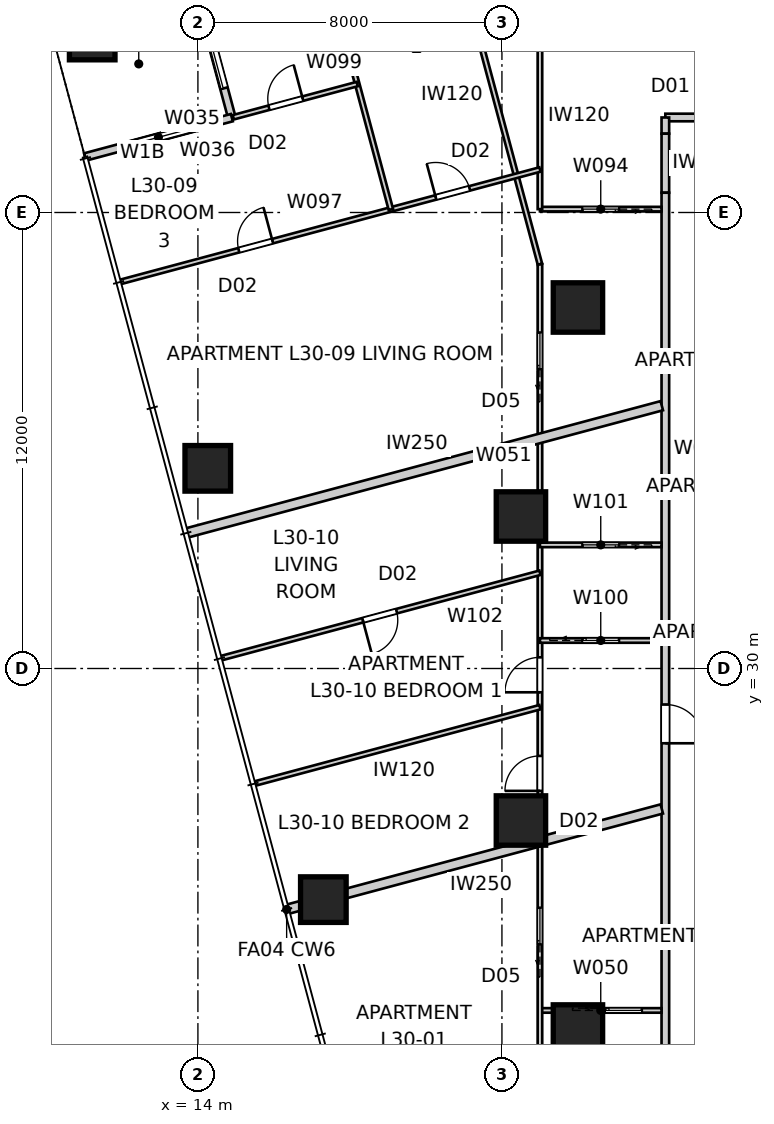
"""IFC4 building model, lengths in metres.
Left out: names, types, materials, properties, quantities, classifications, styles, units other than length and angle.
Written with IfcOpenShell. Run it as: python <this file> out.ifc"""

import sys

from ifc_helpers import new_model, si_unit, direction, frame, frame_2d, origin, origin_2d, place, context, subcontext, project, spatial, rectangle, extrude, element, fill, save


model = new_model("IFC4")
c1 = context("Model", 3, precision=1e-05, world=origin(), true_north=direction((0.0, 1.0)))
c2 = subcontext(c1, "Body", "Model", "MODEL_VIEW")
j1 = project(units=[si_unit("LENGTHUNIT", "METRE"), si_unit("PLANEANGLEUNIT", "RADIAN")], contexts=[c1])
p1 = place(None, origin())
s1 = spatial("IfcSite", under=j1, at=p1, CompositionType="ELEMENT")
p2 = place(p1, origin())
s2 = spatial("IfcBuilding", under=s1, at=p2, CompositionType="ELEMENT")
p3 = place(p2, frame((0.0, 0.0, 111.6)))
s3 = spatial("IfcBuildingStorey", under=s2, at=p3, CompositionType="ELEMENT", Elevation=111.6)
for number, where, z_axis, x_axis in (
    (1, (11.219, 46.617, -0.15), (0.0, 0.0, 1.0), (1.0, 0.0, 0.0)),
    (2, (14.26, 35.267, -0.15), (0.0, 0.0, 1.0), (1.0, 0.0, 0.0)),
    (3, (17.301, 23.918, -0.15), (0.0, 0.0, 1.0), (1.0, 0.0, 0.0)),
):
    element("IfcColumn", number, at=place(p3, frame(where, z_axis=z_axis, x_axis=x_axis)), inside=s3, PredefinedType="COLUMN", context=c2, shape_type="SweptSolid", body=[
        extrude(rectangle(XDim=1.2, YDim=1.2, at=origin_2d()), origin(), (0.0, 0.0, 1.0), 3.55),
    ])
for number, where, z_axis, x_axis in (
    (4, (24.0, 39.5, 0.0), (0.0, 0.0, 1.0), (1.0, 0.0, 0.0)),
    (5, (22.5, 34.0, 0.0), (0.0, 0.0, 1.0), (1.0, 0.0, 0.0)),
    (6, (22.5, 26.0, 0.0), (0.0, 0.0, 1.0), (1.0, 0.0, 0.0)),
    (7, (24.0, 20.5, 0.0), (0.0, 0.0, 1.0), (1.0, 0.0, 0.0)),
):
    element("IfcColumn", number, at=place(p3, frame(where, z_axis=z_axis, x_axis=x_axis)), inside=s3, PredefinedType="COLUMN", context=c2, shape_type="SweptSolid", body=[
        extrude(rectangle(XDim=1.3, YDim=1.3, at=origin_2d()), origin(), (0.0, 0.0, 1.0), 3.4),
    ])
p4 = place(p3, frame((13.857, 48.359, 0.0), z_axis=(0.0, 0.0, 1.0), x_axis=(0.258843877716, -0.965919172068, 0.0)))
e8 = element("IfcWall", 8, at=p4, inside=s3, PredefinedType="SOLIDWALL", context=c2, shape_type="SweptSolid", body=[
    extrude(rectangle(XDim=4.0, YDim=0.2, at=frame_2d((2.0, 0.0))), origin(), (0.0, 0.0, 1.0), 3.25),
])
p5 = place(p4, frame((0.8, 0.0, 0.0)))
e9 = element("IfcOpeningElement", 9, at=p5, cuts=e8, PredefinedType="OPENING", context=c2, shape_type="SweptSolid", body=[
    extrude(rectangle(XDim=2.4, YDim=2.1, at=frame_2d((1.2, 1.05))), frame((0.0, 0.11, 0.0), z_axis=(0.0, -1.0, 0.0), x_axis=(1.0, 0.0, 0.0)), (0.0, 0.0, 1.0), 0.22),
])
p6 = place(p3, frame((14.893, 44.496, 0.0), z_axis=(0.0, 0.0, 1.0), x_axis=(-0.965934430412, -0.258786931944, 0.0)))
e10 = element("IfcWall", 10, at=p6, inside=s3, PredefinedType="SOLIDWALL", context=c2, shape_type="SweptSolid", body=[
    extrude(rectangle(XDim=4.0, YDim=0.2, at=frame_2d((2.0, 0.0))), origin(), (0.0, 0.0, 1.0), 3.25),
])
p7 = place(p6, frame((1.0, 0.0, 0.45)))
e11 = element("IfcOpeningElement", 11, at=p7, cuts=e10, PredefinedType="OPENING", context=c2, shape_type="SweptSolid", body=[
    extrude(rectangle(XDim=2.0, YDim=1.8, at=frame_2d((1.0, 0.9))), frame((0.0, 0.11, 0.0), z_axis=(0.0, -1.0, 0.0), x_axis=(1.0, 0.0, 0.0)), (0.0, 0.0, 1.0), 0.22),
])
p8 = place(p3, frame((54.5, 44.5, 0.0), z_axis=(0.0, 0.0, 1.0), x_axis=(-1.0, 0.0, 0.0)))
e12 = element("IfcWall", 12, at=p8, inside=s3, PredefinedType="PARTITIONING", context=c2, shape_type="SweptSolid", body=[
    extrude(rectangle(XDim=28.2, YDim=0.2, at=frame_2d((14.1, 0.0))), origin(), (0.0, 0.0, 1.0), 3.25),
])
p9 = place(p8, frame((10.837, 0.0, 0.0)))
e13 = element("IfcOpeningElement", 13, at=p9, cuts=e12, PredefinedType="OPENING", context=c2, shape_type="SweptSolid", body=[
    extrude(rectangle(XDim=1.02, YDim=2.34, at=frame_2d((0.51, 1.17))), frame((0.0, 0.11, 0.0), z_axis=(0.0, -1.0, 0.0), x_axis=(1.0, 0.0, 0.0)), (0.0, 0.0, 1.0), 0.22),
])
p10 = place(p8, frame((5.7, 0.0, 0.0)))
e14 = element("IfcOpeningElement", 14, at=p10, cuts=e12, PredefinedType="OPENING", context=c2, shape_type="SweptSolid", body=[
    extrude(rectangle(XDim=1.02, YDim=2.34, at=frame_2d((0.51, 1.17))), frame((0.0, 0.11, 0.0), z_axis=(0.0, -1.0, 0.0), x_axis=(1.0, 0.0, 0.0)), (0.0, 0.0, 1.0), 0.22),
])
p11 = place(p8, frame((26.127, 0.0, 0.0)))
e15 = element("IfcOpeningElement", 15, at=p11, cuts=e12, PredefinedType="OPENING", context=c2, shape_type="SweptSolid", body=[
    extrude(rectangle(XDim=1.02, YDim=2.34, at=frame_2d((0.51, 1.17))), frame((0.0, 0.11, 0.0), z_axis=(0.0, -1.0, 0.0), x_axis=(1.0, 0.0, 0.0)), (0.0, 0.0, 1.0), 0.22),
])
p12 = place(p3, frame((26.3, 44.5, 0.0), z_axis=(0.0, 0.0, 1.0), x_axis=(0.0, -1.0, 0.0)))
e16 = element("IfcWall", 16, at=p12, inside=s3, PredefinedType="PARTITIONING", context=c2, shape_type="SweptSolid", body=[
    extrude(rectangle(XDim=0.426, YDim=0.2, at=frame_2d((0.213, 0.0))), origin(), (0.0, 0.0, 1.0), 3.25),
])
p13 = place(p3, frame((26.3, 44.074, 0.0), z_axis=(0.0, 0.0, 1.0), x_axis=(0.0, -1.0, 0.0)))
e17 = element("IfcWall", 17, at=p13, inside=s3, PredefinedType="PARTITIONING", context=c2, shape_type="SweptSolid", body=[
    extrude(rectangle(XDim=1.554, YDim=0.2, at=frame_2d((0.777, 0.0))), origin(), (0.0, 0.0, 1.0), 2.722),
])
p14 = place(p3, frame((26.3, 42.52, 0.0), z_axis=(0.0, 0.0, 1.0), x_axis=(0.0, -1.0, 0.0)))
e18 = element("IfcWall", 18, at=p14, inside=s3, PredefinedType="PARTITIONING", context=c2, shape_type="SweptSolid", body=[
    extrude(rectangle(XDim=27.02, YDim=0.2, at=frame_2d((13.51, 0.0))), origin(), (0.0, 0.0, 1.0), 3.25),
])
p15 = place(p14, frame((23.584, 0.0, 0.0)))
e19 = element("IfcOpeningElement", 19, at=p15, cuts=e18, PredefinedType="OPENING", context=c2, shape_type="SweptSolid", body=[
    extrude(rectangle(XDim=1.02, YDim=2.1, at=frame_2d((0.51, 1.05))), frame((0.0, 0.11, 0.0), z_axis=(0.0, -1.0, 0.0), x_axis=(1.0, 0.0, 0.0)), (0.0, 0.0, 1.0), 0.22),
])
p16 = place(p14, frame((13.468, 0.0, 0.0)))
e20 = element("IfcOpeningElement", 20, at=p16, cuts=e18, PredefinedType="OPENING", context=c2, shape_type="SweptSolid", body=[
    extrude(rectangle(XDim=1.02, YDim=2.34, at=frame_2d((0.51, 1.17))), frame((0.0, 0.11, 0.0), z_axis=(0.0, -1.0, 0.0), x_axis=(1.0, 0.0, 0.0)), (0.0, 0.0, 1.0), 0.22),
])
p17 = place(p3, frame((27.058, 51.896, 0.0), z_axis=(0.0, 0.0, 1.0), x_axis=(0.258822171171, -0.965924988656, 0.0)))
e21 = element("IfcWall", 21, at=p17, inside=s3, PredefinedType="PARTITIONING", context=c2, shape_type="SweptSolid", body=[
    extrude(rectangle(XDim=7.56, YDim=0.25, at=frame_2d((3.78, 0.0))), origin(), (0.0, 0.0, 1.0), 3.25),
])
p18 = place(p3, frame((16.335, 23.659, 0.0), z_axis=(0.0, 0.0, 1.0), x_axis=(0.965927365002, 0.258813302479, 0.0)))
e22 = element("IfcWall", 22, at=p18, inside=s3, PredefinedType="PARTITIONING", context=c2, shape_type="SweptSolid", body=[
    extrude(rectangle(XDim=10.22, YDim=0.25, at=frame_2d((5.11, 0.0))), origin(), (0.0, 0.0, 1.0), 3.25),
])
p19 = place(p3, frame((13.682, 33.56, 0.0), z_axis=(0.0, 0.0, 1.0), x_axis=(0.965924854576, 0.258822671559, 0.0)))
e23 = element("IfcWall", 23, at=p19, inside=s3, PredefinedType="PARTITIONING", context=c2, shape_type="SweptSolid", body=[
    extrude(rectangle(XDim=12.966, YDim=0.25, at=frame_2d((6.483, 0.0))), origin(), (0.0, 0.0, 1.0), 3.25),
])
p20 = place(p3, frame((23.0, 21.002, 0.0), z_axis=(0.0, 0.0, 1.0), x_axis=(1.0, 0.0, 0.0)))
e24 = element("IfcWall", 24, at=p20, inside=s3, PredefinedType="PARTITIONING", context=c2, shape_type="SweptSolid", body=[
    extrude(rectangle(XDim=3.2, YDim=0.12, at=frame_2d((1.6, 0.0))), origin(), (0.0, 0.0, 1.0), 3.25),
])
p21 = place(p20, frame((1.72, 0.0, 0.0)))
e25 = element("IfcOpeningElement", 25, at=p21, cuts=e24, PredefinedType="OPENING", context=c2, shape_type="SweptSolid", body=[
    extrude(rectangle(XDim=0.96, YDim=2.1, at=frame_2d((0.48, 1.05))), frame((0.0, 0.07, 0.0), z_axis=(0.0, -1.0, 0.0), x_axis=(1.0, 0.0, 0.0)), (0.0, 0.0, 1.0), 0.14),
])
p22 = place(p3, frame((23.0, 13.0, 0.0), z_axis=(0.0, 0.0, 1.0), x_axis=(0.0, 1.0, 0.0)))
e26 = element("IfcWall", 26, at=p22, inside=s3, PredefinedType="PARTITIONING", context=c2, shape_type="SweptSolid", body=[
    extrude(rectangle(XDim=27.64, YDim=0.12, at=frame_2d((13.82, 0.0))), origin(), (0.0, 0.0, 1.0), 2.55),
])
p23 = place(p22, frame((3.192, 0.0, 0.0)))
e27 = element("IfcOpeningElement", 27, at=p23, cuts=e26, PredefinedType="OPENING", context=c2, shape_type="SweptSolid", body=[
    extrude(rectangle(XDim=0.92, YDim=2.34, at=frame_2d((0.46, 1.17))), frame((0.0, 0.07, 0.0), z_axis=(0.0, -1.0, 0.0), x_axis=(1.0, 0.0, 0.0)), (0.0, 0.0, 1.0), 0.14),
])
p24 = place(p22, frame((13.779, 0.0, 0.0)))
e28 = element("IfcOpeningElement", 28, at=p24, cuts=e26, PredefinedType="OPENING", context=c2, shape_type="SweptSolid", body=[
    extrude(rectangle(XDim=0.92, YDim=2.34, at=frame_2d((0.46, 1.17))), frame((0.0, 0.07, 0.0), z_axis=(0.0, -1.0, 0.0), x_axis=(1.0, 0.0, 0.0)), (0.0, 0.0, 1.0), 0.14),
])
p25 = place(p22, frame((16.374, 0.0, 0.0)))
e29 = element("IfcOpeningElement", 29, at=p25, cuts=e26, PredefinedType="OPENING", context=c2, shape_type="SweptSolid", body=[
    extrude(rectangle(XDim=0.92, YDim=2.34, at=frame_2d((0.46, 1.17))), frame((0.0, 0.07, 0.0), z_axis=(0.0, -1.0, 0.0), x_axis=(1.0, 0.0, 0.0)), (0.0, 0.0, 1.0), 0.14),
])
p26 = place(p22, frame((9.743, 0.0, 0.0)))
e30 = element("IfcOpeningElement", 30, at=p26, cuts=e26, PredefinedType="OPENING", context=c2, shape_type="SweptSolid", body=[
    extrude(rectangle(XDim=0.96, YDim=2.1, at=frame_2d((0.48, 1.05))), frame((0.0, 0.07, 0.0), z_axis=(0.0, -1.0, 0.0), x_axis=(1.0, 0.0, 0.0)), (0.0, 0.0, 1.0), 0.14),
])
p27 = place(p22, frame((24.879, 0.0, 0.0)))
e31 = element("IfcOpeningElement", 31, at=p27, cuts=e26, PredefinedType="OPENING", context=c2, shape_type="SweptSolid", body=[
    extrude(rectangle(XDim=0.96, YDim=2.1, at=frame_2d((0.48, 1.05))), frame((0.0, 0.07, 0.0), z_axis=(0.0, -1.0, 0.0), x_axis=(1.0, 0.0, 0.0)), (0.0, 0.0, 1.0), 0.14),
])
p28 = place(p3, frame((26.2, 42.089, 0.0), z_axis=(0.0, 0.0, 1.0), x_axis=(-1.0, 0.0, 0.0)))
e32 = element("IfcWall", 32, at=p28, inside=s3, PredefinedType="PARTITIONING", context=c2, shape_type="SweptSolid", body=[
    extrude(rectangle(XDim=3.2, YDim=0.12, at=frame_2d((1.6, 0.0))), origin(), (0.0, 0.0, 1.0), 3.25),
])
p29 = place(p28, frame((1.12, 0.0, 0.0)))
e33 = element("IfcOpeningElement", 33, at=p29, cuts=e32, PredefinedType="OPENING", context=c2, shape_type="SweptSolid", body=[
    extrude(rectangle(XDim=0.96, YDim=2.1, at=frame_2d((0.48, 1.05))), frame((0.0, 0.07, 0.0), z_axis=(0.0, -1.0, 0.0), x_axis=(1.0, 0.0, 0.0)), (0.0, 0.0, 1.0), 0.14),
])
p30 = place(p3, frame((23.0, 42.089, 0.0), z_axis=(0.0, 0.0, 1.0), x_axis=(0.0, 1.0, 0.0)))
e34 = element("IfcWall", 34, at=p30, inside=s3, PredefinedType="PARTITIONING", context=c2, shape_type="SweptSolid", body=[
    extrude(rectangle(XDim=4.911, YDim=0.12, at=frame_2d((2.456, 0.0))), origin(), (0.0, 0.0, 1.0), 3.25),
])
p31 = place(p3, frame((23.0, 40.64, 0.0), z_axis=(0.0, 0.0, 1.0), x_axis=(-0.258790139317, 0.965933571108, 0.0)))
e35 = element("IfcWall", 35, at=p31, inside=s3, PredefinedType="PARTITIONING", context=c2, shape_type="SweptSolid", body=[
    extrude(rectangle(XDim=9.783, YDim=0.12, at=frame_2d((4.892, 0.0))), origin(), (0.0, 0.0, 1.0), 2.638),
])
p32 = place(p3, frame((11.952, 40.17, 0.0), z_axis=(0.0, 0.0, 1.0), x_axis=(0.965923183761, 0.258828906952, 0.0)))
e36 = element("IfcWall", 36, at=p32, inside=s3, PredefinedType="PARTITIONING", context=c2, shape_type="SweptSolid", body=[
    extrude(rectangle(XDim=11.438, YDim=0.12, at=frame_2d((5.719, 0.0))), origin(), (0.0, 0.0, 1.0), 3.25),
])
p33 = place(p32, frame((3.233, 0.0, 0.0)))
e37 = element("IfcOpeningElement", 37, at=p33, cuts=e36, PredefinedType="OPENING", context=c2, shape_type="SweptSolid", body=[
    extrude(rectangle(XDim=0.92, YDim=2.34, at=frame_2d((0.46, 1.17))), frame((0.0, 0.07, 0.0), z_axis=(0.0, -1.0, 0.0), x_axis=(1.0, 0.0, 0.0)), (0.0, 0.0, 1.0), 0.14),
])
p34 = place(p32, frame((8.6, 0.0, 0.0)))
e38 = element("IfcOpeningElement", 38, at=p34, cuts=e36, PredefinedType="OPENING", context=c2, shape_type="SweptSolid", body=[
    extrude(rectangle(XDim=0.92, YDim=2.34, at=frame_2d((0.46, 1.17))), frame((0.0, 0.07, 0.0), z_axis=(0.0, -1.0, 0.0), x_axis=(1.0, 0.0, 0.0)), (0.0, 0.0, 1.0), 0.14),
])
p35 = place(p3, frame((19.077, 42.08, 0.0), z_axis=(0.0, 0.0, 1.0), x_axis=(-0.258846923464, 0.965918355874, 0.0)))
e39 = element("IfcWall", 39, at=p35, inside=s3, PredefinedType="PARTITIONING", context=c2, shape_type="SweptSolid", body=[
    extrude(rectangle(XDim=7.377, YDim=0.12, at=frame_2d((3.688, 0.0))), origin(), (0.0, 0.0, 1.0), 3.25),
])
p36 = place(p3, frame((14.931, 44.506, 0.0), z_axis=(0.0, 0.0, 1.0), x_axis=(0.96593546512, 0.258783069815, 0.0)))
e40 = element("IfcWall", 40, at=p36, inside=s3, PredefinedType="PARTITIONING", context=c2, shape_type="SweptSolid", body=[
    extrude(rectangle(XDim=3.376, YDim=0.12, at=frame_2d((1.688, 0.0))), origin(), (0.0, 0.0, 1.0), 3.25),
])
p37 = place(p36, frame((0.971, 0.0, 0.0)))
e41 = element("IfcOpeningElement", 41, at=p37, cuts=e40, PredefinedType="OPENING", context=c2, shape_type="SweptSolid", body=[
    extrude(rectangle(XDim=0.92, YDim=2.34, at=frame_2d((0.46, 1.17))), frame((0.0, 0.07, 0.0), z_axis=(0.0, -1.0, 0.0), x_axis=(1.0, 0.0, 0.0)), (0.0, 0.0, 1.0), 0.14),
])
p38 = place(p3, frame((23.0, 30.737, 0.0), z_axis=(0.0, 0.0, 1.0), x_axis=(1.0, 0.0, 0.0)))
e42 = element("IfcWall", 42, at=p38, inside=s3, PredefinedType="PARTITIONING", context=c2, shape_type="SweptSolid", body=[
    extrude(rectangle(XDim=3.2, YDim=0.12, at=frame_2d((1.6, 0.0))), origin(), (0.0, 0.0, 1.0), 3.25),
])
p39 = place(p38, frame((1.12, 0.0, 0.0)))
e43 = element("IfcOpeningElement", 43, at=p39, cuts=e42, PredefinedType="OPENING", context=c2, shape_type="SweptSolid", body=[
    extrude(rectangle(XDim=0.96, YDim=2.1, at=frame_2d((0.48, 1.05))), frame((0.0, 0.07, 0.0), z_axis=(0.0, -1.0, 0.0), x_axis=(1.0, 0.0, 0.0)), (0.0, 0.0, 1.0), 0.14),
])
p40 = place(p3, frame((26.2, 33.253, 0.0), z_axis=(0.0, 0.0, 1.0), x_axis=(-1.0, 0.0, 0.0)))
e44 = element("IfcWall", 44, at=p40, inside=s3, PredefinedType="PARTITIONING", context=c2, shape_type="SweptSolid", body=[
    extrude(rectangle(XDim=3.2, YDim=0.12, at=frame_2d((1.6, 0.0))), origin(), (0.0, 0.0, 1.0), 3.25),
])
p41 = place(p40, frame((1.12, 0.0, 0.0)))
e45 = element("IfcOpeningElement", 45, at=p41, cuts=e44, PredefinedType="OPENING", context=c2, shape_type="SweptSolid", body=[
    extrude(rectangle(XDim=0.96, YDim=2.1, at=frame_2d((0.48, 1.05))), frame((0.0, 0.07, 0.0), z_axis=(0.0, -1.0, 0.0), x_axis=(1.0, 0.0, 0.0)), (0.0, 0.0, 1.0), 0.14),
])
p42 = place(p3, frame((23.0, 32.519, 0.0), z_axis=(0.0, 0.0, 1.0), x_axis=(-0.965925607751, -0.258819860698, 0.0)))
e46 = element("IfcWall", 46, at=p42, inside=s3, PredefinedType="PARTITIONING", context=c2, shape_type="SweptSolid", body=[
    extrude(rectangle(XDim=8.691, YDim=0.12, at=frame_2d((4.346, 0.0))), origin(), (0.0, 0.0, 1.0), 3.25),
])
p43 = place(p42, frame((3.906, 0.0, 0.0)))
e47 = element("IfcOpeningElement", 47, at=p43, cuts=e46, PredefinedType="OPENING", context=c2, shape_type="SweptSolid", body=[
    extrude(rectangle(XDim=0.92, YDim=2.34, at=frame_2d((0.46, 1.17))), frame((0.0, 0.07, 0.0), z_axis=(0.0, -1.0, 0.0), x_axis=(1.0, 0.0, 0.0)), (0.0, 0.0, 1.0), 0.14),
])
p44 = place(p3, frame((23.0, 28.982, 0.0), z_axis=(0.0, 0.0, 1.0), x_axis=(-0.965927309482, -0.258813509689, 0.0)))
e48 = element("IfcWall", 48, at=p44, inside=s3, PredefinedType="PARTITIONING", context=c2, shape_type="SweptSolid", body=[
    extrude(rectangle(XDim=7.776, YDim=0.12, at=frame_2d((3.888, 0.0))), origin(), (0.0, 0.0, 1.0), 3.25),
])
p45 = place(p5, origin())
e49 = element("IfcDoor", 49, at=p45, inside=s3, OperationType="SLIDING_TO_LEFT", PredefinedType="DOOR", context=c2, shape_type="SweptSolid", body=[
    extrude(rectangle(XDim=2.4, YDim=2.1, at=frame_2d((1.2, 1.05))), frame((0.0, 0.025, 0.0), z_axis=(0.0, -1.0, 0.0), x_axis=(1.0, 0.0, 0.0)), (0.0, 0.0, 1.0), 0.05),
])
fill(e9, e49)
p46 = place(p7, origin())
e50 = element("IfcWindow", 50, at=p46, inside=s3, PartitioningType="SINGLE_PANEL", PredefinedType="WINDOW", context=c2, shape_type="SweptSolid", body=[
    extrude(rectangle(XDim=2.0, YDim=1.8, at=frame_2d((1.0, 0.9))), frame((0.0, 0.03, 0.0), z_axis=(0.0, -1.0, 0.0), x_axis=(1.0, 0.0, 0.0)), (0.0, 0.0, 1.0), 0.06),
])
fill(e11, e50)
p47 = place(p16, origin())
e51 = element("IfcDoor", 51, at=p47, inside=s3, OperationType="SINGLE_SWING_RIGHT", PredefinedType="DOOR", context=c2, shape_type="SweptSolid", body=[
    extrude(rectangle(XDim=1.02, YDim=2.34, at=frame_2d((0.51, 1.17))), frame((0.0, 0.025, 0.0), z_axis=(0.0, -1.0, 0.0), x_axis=(1.0, 0.0, 0.0)), (0.0, 0.0, 1.0), 0.05),
])
fill(e20, e51)
p48 = place(p21, origin())
e52 = element("IfcDoor", 52, at=p48, inside=s3, OperationType="SLIDING_TO_LEFT", PredefinedType="DOOR", context=c2, shape_type="SweptSolid", body=[
    extrude(rectangle(XDim=0.96, YDim=2.1, at=frame_2d((0.48, 1.05))), frame((0.0, 0.025, 0.0), z_axis=(0.0, -1.0, 0.0), x_axis=(1.0, 0.0, 0.0)), (0.0, 0.0, 1.0), 0.05),
])
fill(e25, e52)
p49 = place(p24, origin())
e53 = element("IfcDoor", 53, at=p49, inside=s3, OperationType="SINGLE_SWING_LEFT", PredefinedType="DOOR", context=c2, shape_type="SweptSolid", body=[
    extrude(rectangle(XDim=0.92, YDim=2.34, at=frame_2d((0.46, 1.17))), frame((0.0, 0.025, 0.0), z_axis=(0.0, -1.0, 0.0), x_axis=(1.0, 0.0, 0.0)), (0.0, 0.0, 1.0), 0.05),
])
fill(e28, e53)
p50 = place(p39, origin())
e54 = element("IfcDoor", 54, at=p50, inside=s3, OperationType="SLIDING_TO_LEFT", PredefinedType="DOOR", context=c2, shape_type="SweptSolid", body=[
    extrude(rectangle(XDim=0.96, YDim=2.1, at=frame_2d((0.48, 1.05))), frame((0.0, 0.025, 0.0), z_axis=(0.0, -1.0, 0.0), x_axis=(1.0, 0.0, 0.0)), (0.0, 0.0, 1.0), 0.05),
])
fill(e43, e54)
p51 = place(p25, origin())
e55 = element("IfcDoor", 55, at=p51, inside=s3, OperationType="SINGLE_SWING_LEFT", PredefinedType="DOOR", context=c2, shape_type="SweptSolid", body=[
    extrude(rectangle(XDim=0.92, YDim=2.34, at=frame_2d((0.46, 1.17))), frame((0.0, 0.025, 0.0), z_axis=(0.0, -1.0, 0.0), x_axis=(1.0, 0.0, 0.0)), (0.0, 0.0, 1.0), 0.05),
])
fill(e29, e55)
p52 = place(p29, origin())
e56 = element("IfcDoor", 56, at=p52, inside=s3, OperationType="SLIDING_TO_LEFT", PredefinedType="DOOR", context=c2, shape_type="SweptSolid", body=[
    extrude(rectangle(XDim=0.96, YDim=2.1, at=frame_2d((0.48, 1.05))), frame((0.0, 0.025, 0.0), z_axis=(0.0, -1.0, 0.0), x_axis=(1.0, 0.0, 0.0)), (0.0, 0.0, 1.0), 0.05),
])
fill(e33, e56)
p53 = place(p26, origin())
e57 = element("IfcDoor", 57, at=p53, inside=s3, OperationType="SLIDING_TO_LEFT", PredefinedType="DOOR", context=c2, shape_type="SweptSolid", body=[
    extrude(rectangle(XDim=0.96, YDim=2.1, at=frame_2d((0.48, 1.05))), frame((0.0, 0.025, 0.0), z_axis=(0.0, -1.0, 0.0), x_axis=(1.0, 0.0, 0.0)), (0.0, 0.0, 1.0), 0.05),
])
fill(e30, e57)
p54 = place(p41, origin())
e58 = element("IfcDoor", 58, at=p54, inside=s3, OperationType="SLIDING_TO_LEFT", PredefinedType="DOOR", context=c2, shape_type="SweptSolid", body=[
    extrude(rectangle(XDim=0.96, YDim=2.1, at=frame_2d((0.48, 1.05))), frame((0.0, 0.025, 0.0), z_axis=(0.0, -1.0, 0.0), x_axis=(1.0, 0.0, 0.0)), (0.0, 0.0, 1.0), 0.05),
])
fill(e45, e58)
p55 = place(p27, origin())
e59 = element("IfcDoor", 59, at=p55, inside=s3, OperationType="SLIDING_TO_LEFT", PredefinedType="DOOR", context=c2, shape_type="SweptSolid", body=[
    extrude(rectangle(XDim=0.96, YDim=2.1, at=frame_2d((0.48, 1.05))), frame((0.0, 0.025, 0.0), z_axis=(0.0, -1.0, 0.0), x_axis=(1.0, 0.0, 0.0)), (0.0, 0.0, 1.0), 0.05),
])
fill(e31, e59)
p56 = place(p33, origin())
e60 = element("IfcDoor", 60, at=p56, inside=s3, OperationType="SINGLE_SWING_RIGHT", PredefinedType="DOOR", context=c2, shape_type="SweptSolid", body=[
    extrude(rectangle(XDim=0.92, YDim=2.34, at=frame_2d((0.46, 1.17))), frame((0.0, 0.025, 0.0), z_axis=(0.0, -1.0, 0.0), x_axis=(1.0, 0.0, 0.0)), (0.0, 0.0, 1.0), 0.05),
])
fill(e37, e60)
p57 = place(p34, origin())
e61 = element("IfcDoor", 61, at=p57, inside=s3, OperationType="SINGLE_SWING_LEFT", PredefinedType="DOOR", context=c2, shape_type="SweptSolid", body=[
    extrude(rectangle(XDim=0.92, YDim=2.34, at=frame_2d((0.46, 1.17))), frame((0.0, 0.025, 0.0), z_axis=(0.0, -1.0, 0.0), x_axis=(1.0, 0.0, 0.0)), (0.0, 0.0, 1.0), 0.05),
])
fill(e38, e61)
p58 = place(p43, origin())
e62 = element("IfcDoor", 62, at=p58, inside=s3, OperationType="SINGLE_SWING_RIGHT", PredefinedType="DOOR", context=c2, shape_type="SweptSolid", body=[
    extrude(rectangle(XDim=0.92, YDim=2.34, at=frame_2d((0.46, 1.17))), frame((0.0, 0.025, 0.0), z_axis=(0.0, -1.0, 0.0), x_axis=(1.0, 0.0, 0.0)), (0.0, 0.0, 1.0), 0.05),
])
fill(e47, e62)
p59 = place(p37, origin())
e63 = element("IfcDoor", 63, at=p59, inside=s3, OperationType="SINGLE_SWING_RIGHT", PredefinedType="DOOR", context=c2, shape_type="SweptSolid", body=[
    extrude(rectangle(XDim=0.92, YDim=2.34, at=frame_2d((0.46, 1.17))), frame((0.0, 0.025, 0.0), z_axis=(0.0, -1.0, 0.0), x_axis=(1.0, 0.0, 0.0)), (0.0, 0.0, 1.0), 0.05),
])
fill(e41, e63)
save(model, sys.argv[1])
